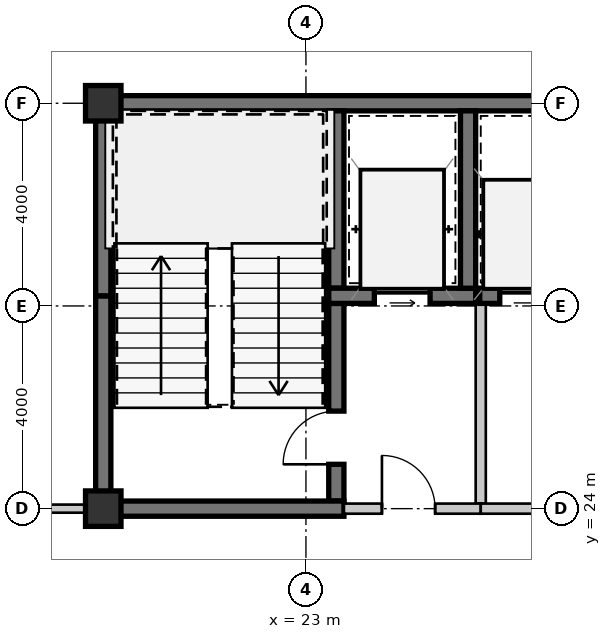
"""IFC4 building model, lengths in metres.
Left out: names, types, materials, properties, quantities, classifications, styles, units other than length and angle.
Written with IfcOpenShell. Run it as: python <this file> out.ifc"""

import sys

from ifc_helpers import new_model, si_unit, direction, frame, frame_2d, origin, origin_2d, place, context, subcontext, project, spatial, rectangle, extrude, source, transform, mapped, element, fill, save


model = new_model("IFC4")
c1 = context("Model", 3, precision=1e-05, world=origin(), true_north=direction((0.0, 1.0)))
c2 = subcontext(c1, "Body", "Model", "MODEL_VIEW")
j1 = project(units=[si_unit("LENGTHUNIT", "METRE"), si_unit("PLANEANGLEUNIT", "RADIAN")], contexts=[c1])
p1 = place(None, origin())
s1 = spatial("IfcSite", under=j1, at=p1, CompositionType="ELEMENT")
p2 = place(p1, origin())
s2 = spatial("IfcBuilding", under=s1, at=p2, CompositionType="ELEMENT")
p3 = place(p2, frame((0.0, 0.0, 68.25)))
s3 = spatial("IfcBuildingStorey", under=s2, at=p3, CompositionType="ELEMENT", Elevation=68.25)
m1 = source(origin(), c2, "Body", "SweptSolid", [
    extrude(rectangle(XDim=0.7, YDim=0.7, at=origin_2d()), origin(), (0.0, 0.0, 1.0), 3.15),
])
for number, where, z_axis, x_axis in (
    (1, (19.0, 24.0, 0.0), (0.0, 0.0, 1.0), (1.0, 0.0, 0.0)),
    (2, (19.0, 32.0, 0.0), (0.0, 0.0, 1.0), (1.0, 0.0, 0.0)),
):
    element("IfcColumn", number, at=place(p3, frame(where, z_axis=z_axis, x_axis=x_axis)), inside=s3, PredefinedType="COLUMN", context=c2, shape_type="MappedRepresentation", body=[
        mapped(m1, transform((0.0, 0.0, 0.0), scale=1.0)),
    ])
m2 = source(origin(), c2, "Body", "SweptSolid", [
    extrude(rectangle(XDim=9.15, YDim=0.3, at=frame_2d((4.575, 0.0))), origin(), (0.0, 0.0, 1.0), 2.93),
])
p4 = place(p3, frame((18.85, 32.0, 0.0), z_axis=(0.0, 0.0, 1.0), x_axis=(1.0, 0.0, 0.0)))
e3 = element("IfcWall", 3, at=p4, inside=s3, PredefinedType="SHEAR", context=c2, shape_type="MappedRepresentation", body=[
    mapped(m2, transform((0.0, 0.0, 0.0), scale=1.0)),
])
m3 = source(origin(), c2, "Body", "SweptSolid", [
    extrude(rectangle(XDim=4.05, YDim=0.3, at=frame_2d((2.025, 0.0))), origin(), (0.0, 0.0, 1.0), 2.93),
])
p5 = place(p3, frame((19.0, 24.15, 0.0), z_axis=(0.0, 0.0, 1.0), x_axis=(0.0, 1.0, 0.0)))
e4 = element("IfcWall", 4, at=p5, inside=s3, PredefinedType="SHEAR", context=c2, shape_type="MappedRepresentation", body=[
    mapped(m3, transform((0.0, 0.0, 0.0), scale=1.0)),
])
m4 = source(origin(), c2, "Body", "SweptSolid", [
    extrude(rectangle(XDim=3.65, YDim=0.3, at=frame_2d((1.825, 0.0))), origin(), (0.0, 0.0, 1.0), 2.93),
])
p6 = place(p3, frame((19.0, 28.2, 0.0), z_axis=(0.0, 0.0, 1.0), x_axis=(0.0, 1.0, 0.0)))
e5 = element("IfcWall", 5, at=p6, inside=s3, PredefinedType="SHEAR", context=c2, shape_type="MappedRepresentation", body=[
    mapped(m4, transform((0.0, 0.0, 0.0), scale=1.0)),
])
m5 = source(origin(), c2, "Body", "SweptSolid", [
    extrude(rectangle(XDim=3.5, YDim=0.3, at=frame_2d((1.75, 0.0))), origin(), (0.0, 0.0, 1.0), 2.93),
])
p7 = place(p3, frame((23.6, 28.35, 0.0), z_axis=(0.0, 0.0, 1.0), x_axis=(0.0, 1.0, 0.0)))
e6 = element("IfcWall", 6, at=p7, inside=s3, PredefinedType="SHEAR", context=c2, shape_type="MappedRepresentation", body=[
    mapped(m5, transform((0.0, 0.0, 0.0), scale=1.0)),
])
m6 = source(origin(), c2, "Body", "SweptSolid", [
    extrude(rectangle(XDim=3.9, YDim=0.3, at=frame_2d((1.95, 0.0))), origin(), (0.0, 0.0, 1.0), 2.93),
])
p8 = place(p3, frame((23.6, 24.15, 0.0), z_axis=(0.0, 0.0, 1.0), x_axis=(0.0, 1.0, 0.0)))
e7 = element("IfcWall", 7, at=p8, inside=s3, PredefinedType="SHEAR", context=c2, shape_type="MappedRepresentation", body=[
    mapped(m6, transform((0.0, 0.0, 0.0), scale=1.0)),
])
m7 = source(origin(), c2, "Body", "SweptSolid", [
    extrude(rectangle(XDim=1.05, YDim=2.1, at=frame_2d((0.525, 1.05))), frame((0.0, 0.16, 0.0), z_axis=(0.0, -1.0, 0.0), x_axis=(1.0, 0.0, 0.0)), (0.0, 0.0, 1.0), 0.32),
])
p9 = place(p8, frame((0.725, 0.0, 0.0)))
e8 = element("IfcOpeningElement", 8, at=p9, cuts=e7, PredefinedType="OPENING", context=c2, shape_type="MappedRepresentation", body=[
    mapped(m7, transform((0.0, 0.0, 0.0), scale=1.0)),
])
m8 = source(origin(), c2, "Body", "SweptSolid", [
    extrude(rectangle(XDim=4.9, YDim=0.3, at=frame_2d((2.45, 0.0))), origin(), (0.0, 0.0, 1.0), 2.93),
])
p10 = place(p3, frame((18.85, 24.0, 0.0), z_axis=(0.0, 0.0, 1.0), x_axis=(1.0, 0.0, 0.0)))
e9 = element("IfcWall", 9, at=p10, inside=s3, PredefinedType="SHEAR", context=c2, shape_type="MappedRepresentation", body=[
    mapped(m8, transform((0.0, 0.0, 0.0), scale=1.0)),
])
m9 = source(origin(), c2, "Body", "SweptSolid", [
    extrude(rectangle(XDim=2.9, YDim=0.3, at=frame_2d((1.45, 0.0))), origin(), (0.0, 0.0, 1.0), 2.93),
])
p11 = place(p3, frame((23.45, 28.2, 0.0), z_axis=(0.0, 0.0, 1.0), x_axis=(1.0, 0.0, 0.0)))
e10 = element("IfcWall", 10, at=p11, inside=s3, PredefinedType="SHEAR", context=c2, shape_type="MappedRepresentation", body=[
    mapped(m9, transform((0.0, 0.0, 0.0), scale=1.0)),
])
m10 = source(origin(), c2, "Body", "SweptSolid", [
    extrude(rectangle(XDim=1.1, YDim=2.15, at=frame_2d((0.55, 1.075))), frame((0.0, 0.16, 0.0), z_axis=(0.0, -1.0, 0.0), x_axis=(1.0, 0.0, 0.0)), (0.0, 0.0, 1.0), 0.32),
])
p12 = place(p11, frame((0.9, 0.0, 0.0)))
e11 = element("IfcOpeningElement", 11, at=p12, cuts=e10, PredefinedType="OPENING", context=c2, shape_type="MappedRepresentation", body=[
    mapped(m10, transform((0.0, 0.0, 0.0), scale=1.0)),
])
p13 = place(p3, frame((26.2, 28.35, 0.0), z_axis=(0.0, 0.0, 1.0), x_axis=(0.0, 1.0, 0.0)))
e12 = element("IfcWall", 12, at=p13, inside=s3, PredefinedType="SHEAR", context=c2, shape_type="MappedRepresentation", body=[
    mapped(m5, transform((0.0, 0.0, 0.0), scale=1.0)),
])
m11 = source(origin(), c2, "Body", "SweptSolid", [
    extrude(rectangle(XDim=3.95, YDim=0.2, at=frame_2d((1.975, 0.0))), origin(), (0.0, 0.0, 1.0), 2.93),
])
p14 = place(p3, frame((26.45, 24.1, 0.0), z_axis=(0.0, 0.0, 1.0), x_axis=(0.0, 1.0, 0.0)))
e13 = element("IfcWall", 13, at=p14, inside=s3, PredefinedType="SOLIDWALL", context=c2, shape_type="MappedRepresentation", body=[
    mapped(m11, transform((0.0, 0.0, 0.0), scale=1.0)),
])
m12 = source(origin(), c2, "Body", "SweptSolid", [
    extrude(rectangle(XDim=2.7, YDim=0.2, at=frame_2d((1.35, 0.0))), origin(), (0.0, 0.0, 1.0), 2.47),
])
p15 = place(p3, frame((23.75, 24.0, 0.0), z_axis=(0.0, 0.0, 1.0), x_axis=(1.0, 0.0, 0.0)))
e14 = element("IfcWall", 14, at=p15, inside=s3, PredefinedType="SOLIDWALL", context=c2, shape_type="MappedRepresentation", body=[
    mapped(m12, transform((0.0, 0.0, 0.0), scale=1.0)),
])
m13 = source(origin(), c2, "Body", "SweptSolid", [
    extrude(rectangle(XDim=1.05, YDim=2.1, at=frame_2d((0.525, 1.05))), frame((0.0, 0.11, 0.0), z_axis=(0.0, -1.0, 0.0), x_axis=(1.0, 0.0, 0.0)), (0.0, 0.0, 1.0), 0.22),
])
p16 = place(p15, frame((0.75, 0.0, 0.0)))
e15 = element("IfcOpeningElement", 15, at=p16, cuts=e14, PredefinedType="OPENING", context=c2, shape_type="MappedRepresentation", body=[
    mapped(m13, transform((0.0, 0.0, 0.0), scale=1.0)),
])
m14 = source(origin(), c2, "Body", "SweptSolid", [
    extrude(rectangle(XDim=2.07, YDim=0.3, at=frame_2d((1.035, 0.0))), origin(), (0.0, 0.0, 1.0), 2.93),
])
p17 = place(p3, frame((26.43, 28.2, 0.0), z_axis=(0.0, 0.0, 1.0), x_axis=(1.0, 0.0, 0.0)))
e16 = element("IfcWall", 16, at=p17, inside=s3, PredefinedType="SHEAR", context=c2, shape_type="MappedRepresentation", body=[
    mapped(m14, transform((0.0, 0.0, 0.0), scale=1.0)),
])
m15 = source(origin(), c2, "Body", "SweptSolid", [
    extrude(rectangle(XDim=1.05, YDim=2.15, at=frame_2d((0.525, 1.075))), frame((0.0, 0.16, 0.0), z_axis=(0.0, -1.0, 0.0), x_axis=(1.0, 0.0, 0.0)), (0.0, 0.0, 1.0), 0.32),
])
p18 = place(p17, frame((0.395, 0.0, 0.0)))
e17 = element("IfcOpeningElement", 17, at=p18, cuts=e16, PredefinedType="OPENING", context=c2, shape_type="MappedRepresentation", body=[
    mapped(m15, transform((0.0, 0.0, 0.0), scale=1.0)),
])
m16 = source(origin(), c2, "Body", "SweptSolid", [
    extrude(rectangle(XDim=4.35, YDim=0.2, at=frame_2d((2.175, 0.0))), origin(), (0.0, 0.0, 1.0), 2.47),
])
p19 = place(p3, frame((30.8, 24.0, 0.0), z_axis=(0.0, 0.0, 1.0), x_axis=(-1.0, 0.0, 0.0)))
e18 = element("IfcWall", 18, at=p19, inside=s3, PredefinedType="SOLIDWALL", context=c2, shape_type="MappedRepresentation", body=[
    mapped(m16, transform((0.0, 0.0, 0.0), scale=1.0)),
])
p20 = place(p19, frame((0.75, 0.0, 0.0)))
e19 = element("IfcOpeningElement", 19, at=p20, cuts=e18, PredefinedType="OPENING", context=c2, shape_type="MappedRepresentation", body=[
    mapped(m13, transform((0.0, 0.0, 0.0), scale=1.0)),
])
m17 = source(origin(), c2, "Body", "SweptSolid", [
    extrude(rectangle(XDim=4.17, YDim=0.16, at=frame_2d((2.085, 0.0))), origin(), (0.0, 0.0, 1.0), 2.93),
])
p21 = place(p3, frame((14.68, 24.0, 0.0), z_axis=(0.0, 0.0, 1.0), x_axis=(1.0, 0.0, 0.0)))
e20 = element("IfcWall", 20, at=p21, inside=s3, PredefinedType="PARTITIONING", context=c2, shape_type="MappedRepresentation", body=[
    mapped(m17, transform((0.0, 0.0, 0.0), scale=1.0)),
])
m18 = source(origin(), c2, "Body", "SweptSolid", [
    extrude(rectangle(XDim=0.92, YDim=2.1, at=frame_2d((0.46, 1.05))), frame((0.0, 0.09, 0.0), z_axis=(0.0, -1.0, 0.0), x_axis=(1.0, 0.0, 0.0)), (0.0, 0.0, 1.0), 0.18),
])
p22 = place(p21, frame((1.69, 0.0, 0.0)))
e21 = element("IfcOpeningElement", 21, at=p22, cuts=e20, PredefinedType="OPENING", context=c2, shape_type="MappedRepresentation", body=[
    mapped(m18, transform((0.0, 0.0, 0.0), scale=1.0)),
])
m19 = source(origin(), c2, "Body", "SweptSolid", [
    extrude(rectangle(XDim=1.05, YDim=2.1, at=frame_2d((0.525, 1.05))), frame((0.0, 0.025, 0.0), z_axis=(0.0, -1.0, 0.0), x_axis=(1.0, 0.0, 0.0)), (0.0, 0.0, 1.0), 0.05),
])
p23 = place(p9, origin())
e22 = element("IfcDoor", 22, at=p23, inside=s3, OperationType="SINGLE_SWING_LEFT", PredefinedType="DOOR", context=c2, shape_type="MappedRepresentation", body=[
    mapped(m19, transform((0.0, 0.0, 0.0), scale=1.0)),
])
fill(e8, e22)
m20 = source(origin(), c2, "Body", "SweptSolid", [
    extrude(rectangle(XDim=1.1, YDim=2.15, at=frame_2d((0.55, 1.075))), frame((0.0, 0.025, 0.0), z_axis=(0.0, -1.0, 0.0), x_axis=(1.0, 0.0, 0.0)), (0.0, 0.0, 1.0), 0.05),
])
p24 = place(p12, origin())
e23 = element("IfcDoor", 23, at=p24, inside=s3, OperationType="SLIDING_TO_LEFT", PredefinedType="DOOR", context=c2, shape_type="MappedRepresentation", body=[
    mapped(m20, transform((0.0, 0.0, 0.0), scale=1.0)),
])
fill(e11, e23)
p25 = place(p16, origin())
e24 = element("IfcDoor", 24, at=p25, inside=s3, OperationType="SINGLE_SWING_LEFT", PredefinedType="DOOR", context=c2, shape_type="MappedRepresentation", body=[
    mapped(m19, transform((0.0, 0.0, 0.0), scale=1.0)),
])
fill(e15, e24)
m21 = source(origin(), c2, "Body", "SweptSolid", [
    extrude(rectangle(XDim=1.05, YDim=2.15, at=frame_2d((0.525, 1.075))), frame((0.0, 0.025, 0.0), z_axis=(0.0, -1.0, 0.0), x_axis=(1.0, 0.0, 0.0)), (0.0, 0.0, 1.0), 0.05),
])
p26 = place(p18, origin())
e25 = element("IfcDoor", 25, at=p26, inside=s3, OperationType="SLIDING_TO_LEFT", PredefinedType="DOOR", context=c2, shape_type="MappedRepresentation", body=[
    mapped(m21, transform((0.0, 0.0, 0.0), scale=1.0)),
])
fill(e17, e25)
save(model, sys.argv[1])
